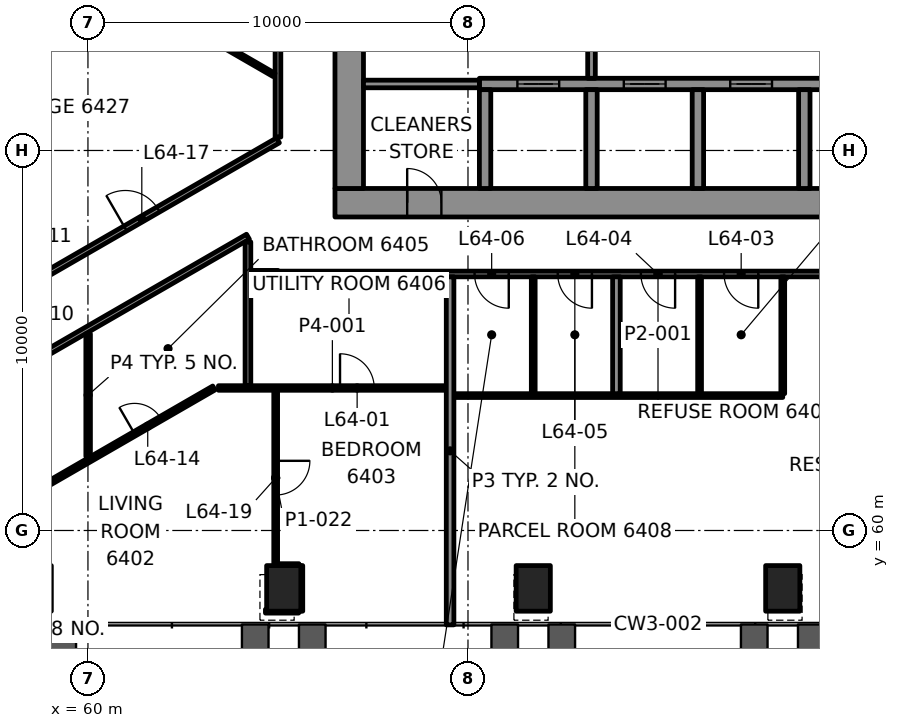
"""IFC4 building model, lengths in metres.
Left out: names, types, materials, properties, quantities, classifications, styles, units other than length and angle.
Written with IfcOpenShell. Run it as: python <this file> out.ifc"""

import sys

from ifc_helpers import new_model, si_unit, direction, frame, frame_2d, origin, origin_2d, place, context, subcontext, project, spatial, rectangle, hollow_rectangle, extrude, element, fill, save


model = new_model("IFC4")
c1 = context("Model", 3, precision=1e-05, world=origin(), true_north=direction((0.0, 1.0)))
c2 = subcontext(c1, "Body", "Model", "MODEL_VIEW")
j1 = project(units=[si_unit("LENGTHUNIT", "METRE"), si_unit("PLANEANGLEUNIT", "RADIAN")], contexts=[c1])
p1 = place(None, origin())
s1 = spatial("IfcSite", under=j1, at=p1, CompositionType="ELEMENT")
p2 = place(p1, origin())
s2 = spatial("IfcBuilding", under=s1, at=p2, CompositionType="ELEMENT")
p3 = place(p2, frame((0.0, 0.0, 270.6)))
s3 = spatial("IfcBuildingStorey", under=s2, at=p3, CompositionType="ELEMENT", Elevation=270.6)
for number, where, z_axis, x_axis in (
    (1, (65.152, 58.476, -0.0), (0.0, 0.0, 1.0), (1.0, 0.0, 0.0)),
    (2, (71.717, 58.476, -0.0), (0.0, 0.0, 1.0), (1.0, 0.0, 0.0)),
    (3, (78.283, 58.476, -0.0), (0.0, 0.0, 1.0), (1.0, 0.0, 0.0)),
):
    element("IfcColumn", number, at=place(p3, frame(where, z_axis=z_axis, x_axis=x_axis)), inside=s3, PredefinedType="COLUMN", context=c2, shape_type="SweptSolid", body=[
        extrude(hollow_rectangle(XDim=0.9, YDim=1.2, WallThickness=0.06, at=origin_2d()), origin(), (0.0, 0.0, 1.0), 3.5),
    ])
p4 = place(p3, frame((66.5, 68.625, 0.0), z_axis=(0.0, 0.0, 1.0), x_axis=(1.0, 0.0, 0.0)))
e4 = element("IfcWall", 4, at=p4, inside=s3, PredefinedType="SHEAR", context=c2, shape_type="SweptSolid", body=[
    extrude(rectangle(XDim=17.0, YDim=0.75, at=frame_2d((8.5, 0.0))), origin(), (0.0, 0.0, 1.0), 3.3),
])
p5 = place(p4, frame((1.9, 0.0, 0.0)))
e5 = element("IfcOpeningElement", 5, at=p5, cuts=e4, PredefinedType="OPENING", context=c2, shape_type="SweptSolid", body=[
    extrude(rectangle(XDim=0.9, YDim=2.1, at=frame_2d((0.45, 1.05))), frame((0.0, 0.385, 0.0), z_axis=(0.0, -1.0, 0.0), x_axis=(1.0, 0.0, 0.0)), (0.0, 0.0, 1.0), 0.77),
])
p6 = place(p3, frame((66.875, 69.0, 0.0), z_axis=(0.0, 0.0, 1.0), x_axis=(0.0, 1.0, 0.0)))
e6 = element("IfcWall", 6, at=p6, inside=s3, PredefinedType="SHEAR", context=c2, shape_type="SweptSolid", body=[
    extrude(rectangle(XDim=12.0, YDim=0.75, at=frame_2d((6.0, 0.0))), origin(), (0.0, 0.0, 1.0), 3.3),
])
p7 = place(p6, frame((3.7, 0.0, 0.0)))
e7 = element("IfcOpeningElement", 7, at=p7, cuts=e6, PredefinedType="OPENING", context=c2, shape_type="SweptSolid", body=[
    extrude(rectangle(XDim=1.2, YDim=2.1, at=frame_2d((0.6, 1.05))), frame((0.0, 0.385, 0.0), z_axis=(0.0, -1.0, 0.0), x_axis=(1.0, 0.0, 0.0)), (0.0, 0.0, 1.0), 0.77),
])
p8 = place(p3, frame((70.3, 71.75, 0.0), z_axis=(0.0, 0.0, 1.0), x_axis=(1.0, 0.0, 0.0)))
e8 = element("IfcWall", 8, at=p8, inside=s3, PredefinedType="SHEAR", context=c2, shape_type="SweptSolid", body=[
    extrude(rectangle(XDim=11.5, YDim=0.3, at=frame_2d((5.75, 0.0))), origin(), (0.0, 0.0, 1.0), 3.3),
])
p9 = place(p8, frame((1.0, 0.0, 0.0)))
e9 = element("IfcOpeningElement", 9, at=p9, cuts=e8, PredefinedType="OPENING", context=c2, shape_type="SweptSolid", body=[
    extrude(rectangle(XDim=1.1, YDim=2.1, at=frame_2d((0.55, 1.05))), frame((0.0, 0.16, 0.0), z_axis=(0.0, -1.0, 0.0), x_axis=(1.0, 0.0, 0.0)), (0.0, 0.0, 1.0), 0.32),
])
p10 = place(p8, frame((3.8, 0.0, 0.0)))
e10 = element("IfcOpeningElement", 10, at=p10, cuts=e8, PredefinedType="OPENING", context=c2, shape_type="SweptSolid", body=[
    extrude(rectangle(XDim=1.1, YDim=2.1, at=frame_2d((0.55, 1.05))), frame((0.0, 0.16, 0.0), z_axis=(0.0, -1.0, 0.0), x_axis=(1.0, 0.0, 0.0)), (0.0, 0.0, 1.0), 0.32),
])
p11 = place(p8, frame((6.6, 0.0, 0.0)))
e11 = element("IfcOpeningElement", 11, at=p11, cuts=e8, PredefinedType="OPENING", context=c2, shape_type="SweptSolid", body=[
    extrude(rectangle(XDim=1.1, YDim=2.1, at=frame_2d((0.55, 1.05))), frame((0.0, 0.16, 0.0), z_axis=(0.0, -1.0, 0.0), x_axis=(1.0, 0.0, 0.0)), (0.0, 0.0, 1.0), 0.32),
])
p12 = place(p8, frame((9.4, 0.0, 0.0)))
e12 = element("IfcOpeningElement", 12, at=p12, cuts=e8, PredefinedType="OPENING", context=c2, shape_type="SweptSolid", body=[
    extrude(rectangle(XDim=1.1, YDim=2.1, at=frame_2d((0.55, 1.05))), frame((0.0, 0.16, 0.0), z_axis=(0.0, -1.0, 0.0), x_axis=(1.0, 0.0, 0.0)), (0.0, 0.0, 1.0), 0.32),
])
for number, where, z_axis, x_axis in (
    (13, (70.45, 69.0, 0.0), (0.0, 0.0, 1.0), (0.0, 1.0, 0.0)),
    (14, (73.25, 69.0, 0.0), (0.0, 0.0, 1.0), (0.0, 1.0, 0.0)),
    (15, (76.05, 69.0, 0.0), (0.0, 0.0, 1.0), (0.0, 1.0, 0.0)),
    (16, (78.85, 69.0, 0.0), (0.0, 0.0, 1.0), (0.0, 1.0, 0.0)),
):
    element("IfcWall", number, at=place(p3, frame(where, z_axis=z_axis, x_axis=x_axis)), inside=s3, PredefinedType="SHEAR", context=c2, shape_type="SweptSolid", body=[
        extrude(rectangle(XDim=2.6, YDim=0.3, at=frame_2d((1.3, 0.0))), origin(), (0.0, 0.0, 1.0), 3.3),
    ])
p13 = place(p3, frame((64.67, 57.876, 0.0), z_axis=(0.0, 0.0, 1.0), x_axis=(1.0, 0.0, 0.0)))
e17 = element("IfcWall", 17, at=p13, inside=s3, PredefinedType="PARTITIONING", context=c2, shape_type="SweptSolid", body=[
    extrude(rectangle(XDim=0.875, YDim=0.1, at=frame_2d((0.438, 0.0))), origin(), (0.0, 0.0, 1.0), 2.7),
])
p14 = place(p3, frame((64.99, 59.076, 0.0), z_axis=(0.0, 0.0, 1.0), x_axis=(1.0, 0.0, 0.0)))
e18 = element("IfcWall", 18, at=p14, inside=s3, PredefinedType="PARTITIONING", context=c2, shape_type="SweptSolid", body=[
    extrude(rectangle(XDim=0.562, YDim=0.1, at=frame_2d((0.281, 0.0))), origin(), (0.0, 0.0, 1.0), 2.7),
])
p15 = place(p3, frame((69.629, 63.55, 0.0), z_axis=(0.0, 0.0, 1.0), x_axis=(1.0, 0.0, 0.0)))
e19 = element("IfcWall", 19, at=p15, inside=s3, PredefinedType="PARTITIONING", context=c2, shape_type="SweptSolid", body=[
    extrude(rectangle(XDim=8.653, YDim=0.1, at=frame_2d((4.326, 0.0))), origin(), (0.0, 0.0, 1.0), 2.7),
])
p16 = place(p3, frame((63.434, 63.75, 0.0), z_axis=(0.0, 0.0, 1.0), x_axis=(1.0, 0.0, 0.0)))
e20 = element("IfcWall", 20, at=p16, inside=s3, PredefinedType="PARTITIONING", context=c2, shape_type="SweptSolid", body=[
    extrude(rectangle(XDim=5.995, YDim=0.12, at=frame_2d((2.997, 0.0))), origin(), (0.0, 0.0, 1.0), 2.7),
])
p17 = place(p16, frame((3.199, 0.0, 0.0)))
e21 = element("IfcOpeningElement", 21, at=p17, cuts=e20, PredefinedType="OPENING", context=c2, shape_type="SweptSolid", body=[
    extrude(rectangle(XDim=0.9, YDim=2.1, at=frame_2d((0.45, 1.05))), frame((0.0, 0.07, 0.0), z_axis=(0.0, -1.0, 0.0), x_axis=(1.0, 0.0, 0.0)), (0.0, 0.0, 1.0), 0.14),
])
p18 = place(p3, frame((85.0, 66.75, 0.0), z_axis=(0.0, 0.0, 1.0), x_axis=(-1.0, 0.0, 0.0)))
e22 = element("IfcWall", 22, at=p18, inside=s3, PredefinedType="PARTITIONING", context=c2, shape_type="SweptSolid", body=[
    extrude(rectangle(XDim=19.999, YDim=0.15, at=frame_2d((10.0, 0.0))), origin(), (0.0, 0.0, 1.0), 2.7),
])
p19 = place(p18, frame((2.96, 0.0, 0.0)))
e23 = element("IfcOpeningElement", 23, at=p19, cuts=e22, PredefinedType="OPENING", context=c2, shape_type="SweptSolid", body=[
    extrude(rectangle(XDim=1.0, YDim=2.1, at=frame_2d((0.5, 1.05))), frame((0.0, 0.085, 0.0), z_axis=(0.0, -1.0, 0.0), x_axis=(1.0, 0.0, 0.0)), (0.0, 0.0, 1.0), 0.17),
])
p20 = place(p18, frame((7.361, 0.0, 0.0)))
e24 = element("IfcOpeningElement", 24, at=p20, cuts=e22, PredefinedType="OPENING", context=c2, shape_type="SweptSolid", body=[
    extrude(rectangle(XDim=0.9, YDim=2.1, at=frame_2d((0.45, 1.05))), frame((0.0, 0.085, 0.0), z_axis=(0.0, -1.0, 0.0), x_axis=(1.0, 0.0, 0.0)), (0.0, 0.0, 1.0), 0.17),
])
p21 = place(p18, frame((9.55, 0.0, 0.0)))
e25 = element("IfcOpeningElement", 25, at=p21, cuts=e22, PredefinedType="OPENING", context=c2, shape_type="SweptSolid", body=[
    extrude(rectangle(XDim=0.9, YDim=2.1, at=frame_2d((0.45, 1.05))), frame((0.0, 0.085, 0.0), z_axis=(0.0, -1.0, 0.0), x_axis=(1.0, 0.0, 0.0)), (0.0, 0.0, 1.0), 0.17),
])
p22 = place(p18, frame((11.738, 0.0, 0.0)))
e26 = element("IfcOpeningElement", 26, at=p22, cuts=e22, PredefinedType="OPENING", context=c2, shape_type="SweptSolid", body=[
    extrude(rectangle(XDim=0.9, YDim=2.1, at=frame_2d((0.45, 1.05))), frame((0.0, 0.085, 0.0), z_axis=(0.0, -1.0, 0.0), x_axis=(1.0, 0.0, 0.0)), (0.0, 0.0, 1.0), 0.17),
])
p23 = place(p18, frame((13.926, 0.0, 0.0)))
e27 = element("IfcOpeningElement", 27, at=p23, cuts=e22, PredefinedType="OPENING", context=c2, shape_type="SweptSolid", body=[
    extrude(rectangle(XDim=0.9, YDim=2.1, at=frame_2d((0.45, 1.05))), frame((0.0, 0.085, 0.0), z_axis=(0.0, -1.0, 0.0), x_axis=(1.0, 0.0, 0.0)), (0.0, 0.0, 1.0), 0.17),
])
p24 = place(p3, frame((64.295, 66.769, 0.0), z_axis=(0.0, 0.0, 1.0), x_axis=(1.0, 0.0, 0.0)))
e28 = element("IfcWall", 28, at=p24, inside=s3, PredefinedType="PARTITIONING", context=c2, shape_type="SweptSolid", body=[
    extrude(rectangle(XDim=0.705, YDim=0.15, at=frame_2d((0.353, 0.0))), origin(), (0.0, 0.0, 1.0), 2.7),
])
p25 = place(p3, frame((52.517, 57.516, 0.0), z_axis=(0.0, 0.0, 1.0), x_axis=(0.866028080334, 0.499995364051, 0.0)))
e29 = element("IfcWall", 29, at=p25, inside=s3, PredefinedType="PARTITIONING", context=c2, shape_type="SweptSolid", body=[
    extrude(rectangle(XDim=12.467, YDim=0.12, at=frame_2d((6.234, 0.0))), origin(), (0.0, 0.0, 1.0), 2.7),
])
p26 = place(p25, frame((3.019, 0.0, 0.0)))
e30 = element("IfcOpeningElement", 30, at=p26, cuts=e29, PredefinedType="OPENING", context=c2, shape_type="SweptSolid", body=[
    extrude(rectangle(XDim=0.9, YDim=2.1, at=frame_2d((0.45, 1.05))), frame((0.0, 0.07, 0.0), z_axis=(0.0, -1.0, 0.0), x_axis=(1.0, 0.0, 0.0)), (0.0, 0.0, 1.0), 0.14),
])
p27 = place(p25, frame((10.057, 0.0, 0.0)))
e31 = element("IfcOpeningElement", 31, at=p27, cuts=e29, PredefinedType="OPENING", context=c2, shape_type="SweptSolid", body=[
    extrude(rectangle(XDim=0.8, YDim=2.1, at=frame_2d((0.4, 1.05))), frame((0.0, 0.07, 0.0), z_axis=(0.0, -1.0, 0.0), x_axis=(1.0, 0.0, 0.0)), (0.0, 0.0, 1.0), 0.14),
])
p28 = place(p3, frame((64.21, 67.731, 0.0), z_axis=(0.0, 0.0, 1.0), x_axis=(-0.866027247007, -0.499996807431, 0.0)))
e32 = element("IfcWall", 32, at=p28, inside=s3, PredefinedType="PARTITIONING", context=c2, shape_type="SweptSolid", body=[
    extrude(rectangle(XDim=12.633, YDim=0.15, at=frame_2d((6.316, 0.0))), origin(), (0.0, 0.0, 1.0), 2.547),
])
p29 = place(p28, frame((8.143, 0.0, 0.0)))
e33 = element("IfcOpeningElement", 33, at=p29, cuts=e32, PredefinedType="OPENING", context=c2, shape_type="SweptSolid", body=[
    extrude(rectangle(XDim=1.0, YDim=2.1, at=frame_2d((0.5, 1.05))), frame((0.0, 0.085, 0.0), z_axis=(0.0, -1.0, 0.0), x_axis=(1.0, 0.0, 0.0)), (0.0, 0.0, 1.0), 0.17),
])
p30 = place(p3, frame((52.37, 62.974, 0.0), z_axis=(0.0, 0.0, 1.0), x_axis=(0.866025849409, 0.499999228155, 0.0)))
e34 = element("IfcWall", 34, at=p30, inside=s3, PredefinedType="PARTITIONING", context=c2, shape_type="SweptSolid", body=[
    extrude(rectangle(XDim=14.584, YDim=0.15, at=frame_2d((7.292, 0.0))), origin(), (0.0, 0.0, 1.0), 2.7),
])
p31 = place(p30, frame((2.858, 0.0, 0.0)))
e35 = element("IfcOpeningElement", 35, at=p31, cuts=e34, PredefinedType="OPENING", context=c2, shape_type="SweptSolid", body=[
    extrude(rectangle(XDim=1.0, YDim=2.1, at=frame_2d((0.5, 1.05))), frame((0.0, 0.085, 0.0), z_axis=(0.0, -1.0, 0.0), x_axis=(1.0, 0.0, 0.0)), (0.0, 0.0, 1.0), 0.17),
])
p32 = place(p30, frame((9.947, 0.0, 0.0)))
e36 = element("IfcOpeningElement", 36, at=p32, cuts=e34, PredefinedType="OPENING", context=c2, shape_type="SweptSolid", body=[
    extrude(rectangle(XDim=1.0, YDim=2.1, at=frame_2d((0.5, 1.05))), frame((0.0, 0.085, 0.0), z_axis=(0.0, -1.0, 0.0), x_axis=(1.0, 0.0, 0.0)), (0.0, 0.0, 1.0), 0.17),
])
p33 = place(p3, frame((78.283, 63.601, 0.0), z_axis=(0.0, 0.0, 1.0), x_axis=(0.0, 1.0, 0.0)))
e37 = element("IfcWall", 37, at=p33, inside=s3, PredefinedType="PARTITIONING", context=c2, shape_type="SweptSolid", body=[
    extrude(rectangle(XDim=3.074, YDim=0.1, at=frame_2d((1.537, 0.0))), origin(), (0.0, 0.0, 1.0), 2.7),
])
p34 = place(p3, frame((76.094, 63.6, 0.0), z_axis=(0.0, 0.0, 1.0), x_axis=(0.0, 1.0, 0.0)))
e38 = element("IfcWall", 38, at=p34, inside=s3, PredefinedType="PARTITIONING", context=c2, shape_type="SweptSolid", body=[
    extrude(rectangle(XDim=3.075, YDim=0.1, at=frame_2d((1.538, 0.0))), origin(), (0.0, 0.0, 1.0), 2.7),
])
p35 = place(p3, frame((73.906, 63.6, 0.0), z_axis=(0.0, 0.0, 1.0), x_axis=(0.0, 1.0, 0.0)))
e39 = element("IfcWall", 39, at=p35, inside=s3, PredefinedType="PARTITIONING", context=c2, shape_type="SweptSolid", body=[
    extrude(rectangle(XDim=3.075, YDim=0.2, at=frame_2d((1.538, 0.0))), origin(), (0.0, 0.0, 1.0), 2.7),
])
p36 = place(p3, frame((71.717, 63.6, 0.0), z_axis=(0.0, 0.0, 1.0), x_axis=(0.0, 1.0, 0.0)))
e40 = element("IfcWall", 40, at=p36, inside=s3, PredefinedType="PARTITIONING", context=c2, shape_type="SweptSolid", body=[
    extrude(rectangle(XDim=3.075, YDim=0.1, at=frame_2d((1.538, 0.0))), origin(), (0.0, 0.0, 1.0), 2.7),
])
p37 = place(p3, frame((69.529, 57.516, 0.0), z_axis=(0.0, 0.0, 1.0), x_axis=(0.0, 1.0, 0.0)))
e41 = element("IfcWall", 41, at=p37, inside=s3, PredefinedType="PARTITIONING", context=c2, shape_type="SweptSolid", body=[
    extrude(rectangle(XDim=9.159, YDim=0.2, at=frame_2d((4.579, 0.0))), origin(), (0.0, 0.0, 1.0), 2.688),
])
p38 = place(p3, frame((65.602, 57.876, 0.0), z_axis=(0.0, 0.0, 1.0), x_axis=(0.0, 1.0, 0.0)))
e42 = element("IfcWall", 42, at=p38, inside=s3, PredefinedType="PARTITIONING", context=c2, shape_type="SweptSolid", body=[
    extrude(rectangle(XDim=1.2, YDim=0.1, at=frame_2d((0.6, 0.0))), origin(), (0.0, 0.0, 1.0), 2.688),
])
p39 = place(p3, frame((65.0, 70.352, 0.0), z_axis=(0.0, 0.0, 1.0), x_axis=(0.0, 1.0, 0.0)))
e43 = element("IfcWall", 43, at=p39, inside=s3, PredefinedType="PARTITIONING", context=c2, shape_type="SweptSolid", body=[
    extrude(rectangle(XDim=12.898, YDim=0.15, at=frame_2d((6.449, 0.0))), origin(), (0.0, 0.0, 1.0), 2.7),
])
p40 = place(p3, frame((64.94, 63.69, 0.0), z_axis=(0.0, 0.0, 1.0), x_axis=(0.0, -1.0, 0.0)))
e44 = element("IfcWall", 44, at=p40, inside=s3, PredefinedType="PARTITIONING", context=c2, shape_type="SweptSolid", body=[
    extrude(rectangle(XDim=4.614, YDim=0.1, at=frame_2d((2.307, 0.0))), origin(), (0.0, 0.0, 1.0), 2.7),
])
p41 = place(p40, frame((1.857, 0.0, 0.0)))
e45 = element("IfcOpeningElement", 45, at=p41, cuts=e44, PredefinedType="OPENING", context=c2, shape_type="SweptSolid", body=[
    extrude(rectangle(XDim=0.9, YDim=2.1, at=frame_2d((0.45, 1.05))), frame((0.0, 0.06, 0.0), z_axis=(0.0, -1.0, 0.0), x_axis=(1.0, 0.0, 0.0)), (0.0, 0.0, 1.0), 0.12),
])
p42 = place(p3, frame((64.21, 63.81, 0.0), z_axis=(0.0, 0.0, 1.0), x_axis=(0.0, 1.0, 0.0)))
e46 = element("IfcWall", 46, at=p42, inside=s3, PredefinedType="PARTITIONING", context=c2, shape_type="SweptSolid", body=[
    extrude(rectangle(XDim=3.784, YDim=0.15, at=frame_2d((1.892, 0.0))), origin(), (0.0, 0.0, 1.0), 2.547),
])
p43 = place(p3, frame((60.005, 61.948, 0.0), z_axis=(0.0, 0.0, 1.0), x_axis=(0.0, 1.0, 0.0)))
e47 = element("IfcWall", 47, at=p43, inside=s3, PredefinedType="PARTITIONING", context=c2, shape_type="SweptSolid", body=[
    extrude(rectangle(XDim=3.228, YDim=0.12, at=frame_2d((1.614, 0.0))), origin(), (0.0, 0.0, 1.0), 2.547),
])
p44 = place(p3, frame((64.899, 71.987, 0.0), z_axis=(0.0, 0.0, 1.0), x_axis=(-0.866032610133, 0.499987518031, 0.0)))
e48 = element("IfcWall", 48, at=p44, inside=s3, PredefinedType="PARTITIONING", context=c2, shape_type="SweptSolid", body=[
    extrude(rectangle(XDim=3.295, YDim=0.1, at=frame_2d((1.648, 0.0))), origin(), (0.0, 0.0, 1.0), 2.7),
])
p45 = place(p3, frame((67.25, 71.75, 0.0), z_axis=(0.0, 0.0, 1.0), x_axis=(1.0, 0.0, 0.0)))
e49 = element("IfcWall", 49, at=p45, inside=s3, PredefinedType="PARTITIONING", context=c2, shape_type="SweptSolid", body=[
    extrude(rectangle(XDim=3.05, YDim=0.2, at=frame_2d((1.525, 0.0))), origin(), (0.0, 0.0, 1.0), 3.3),
])
p46 = place(p3, frame((73.25, 71.9, 0.0), z_axis=(0.0, 0.0, 1.0), x_axis=(0.0, 1.0, 0.0)))
e50 = element("IfcWall", 50, at=p46, inside=s3, PredefinedType="PARTITIONING", context=c2, shape_type="SweptSolid", body=[
    extrude(rectangle(XDim=2.8, YDim=0.2, at=frame_2d((1.4, 0.0))), origin(), (0.0, 0.0, 1.0), 3.3),
])
p47 = place(p46, frame((0.8, 0.0, 0.0)))
e51 = element("IfcOpeningElement", 51, at=p47, cuts=e50, PredefinedType="OPENING", context=c2, shape_type="SweptSolid", body=[
    extrude(rectangle(XDim=1.2, YDim=2.1, at=frame_2d((0.6, 1.05))), frame((0.0, 0.11, 0.0), z_axis=(0.0, -1.0, 0.0), x_axis=(1.0, 0.0, 0.0)), (0.0, 0.0, 1.0), 0.22),
])
p48 = place(p17, origin())
e52 = element("IfcDoor", 52, at=p48, inside=s3, OperationType="SINGLE_SWING_LEFT", PredefinedType="DOOR", context=c2, shape_type="SweptSolid", body=[
    extrude(rectangle(XDim=0.9, YDim=2.1, at=frame_2d((0.45, 1.05))), frame((0.0, 0.025, 0.0), z_axis=(0.0, -1.0, 0.0), x_axis=(1.0, 0.0, 0.0)), (0.0, 0.0, 1.0), 0.05),
])
fill(e21, e52)
p49 = place(p20, origin())
e53 = element("IfcDoor", 53, at=p49, inside=s3, OperationType="SINGLE_SWING_RIGHT", PredefinedType="DOOR", context=c2, shape_type="SweptSolid", body=[
    extrude(rectangle(XDim=0.9, YDim=2.1, at=frame_2d((0.45, 1.05))), frame((0.0, 0.025, 0.0), z_axis=(0.0, -1.0, 0.0), x_axis=(1.0, 0.0, 0.0)), (0.0, 0.0, 1.0), 0.05),
])
fill(e24, e53)
p50 = place(p21, origin())
e54 = element("IfcDoor", 54, at=p50, inside=s3, OperationType="SINGLE_SWING_LEFT", PredefinedType="DOOR", context=c2, shape_type="SweptSolid", body=[
    extrude(rectangle(XDim=0.9, YDim=2.1, at=frame_2d((0.45, 1.05))), frame((0.0, 0.025, 0.0), z_axis=(0.0, -1.0, 0.0), x_axis=(1.0, 0.0, 0.0)), (0.0, 0.0, 1.0), 0.05),
])
fill(e25, e54)
p51 = place(p22, origin())
e55 = element("IfcDoor", 55, at=p51, inside=s3, OperationType="SINGLE_SWING_RIGHT", PredefinedType="DOOR", context=c2, shape_type="SweptSolid", body=[
    extrude(rectangle(XDim=0.9, YDim=2.1, at=frame_2d((0.45, 1.05))), frame((0.0, 0.025, 0.0), z_axis=(0.0, -1.0, 0.0), x_axis=(1.0, 0.0, 0.0)), (0.0, 0.0, 1.0), 0.05),
])
fill(e26, e55)
p52 = place(p23, origin())
e56 = element("IfcDoor", 56, at=p52, inside=s3, OperationType="SINGLE_SWING_LEFT", PredefinedType="DOOR", context=c2, shape_type="SweptSolid", body=[
    extrude(rectangle(XDim=0.9, YDim=2.1, at=frame_2d((0.45, 1.05))), frame((0.0, 0.025, 0.0), z_axis=(0.0, -1.0, 0.0), x_axis=(1.0, 0.0, 0.0)), (0.0, 0.0, 1.0), 0.05),
])
fill(e27, e56)
p53 = place(p27, origin())
e57 = element("IfcDoor", 57, at=p53, inside=s3, OperationType="SINGLE_SWING_RIGHT", PredefinedType="DOOR", context=c2, shape_type="SweptSolid", body=[
    extrude(rectangle(XDim=0.8, YDim=2.1, at=frame_2d((0.4, 1.05))), frame((0.0, 0.025, 0.0), z_axis=(0.0, -1.0, 0.0), x_axis=(1.0, 0.0, 0.0)), (0.0, 0.0, 1.0), 0.05),
])
fill(e31, e57)
p54 = place(p32, origin())
e58 = element("IfcDoor", 58, at=p54, inside=s3, OperationType="SINGLE_SWING_RIGHT", PredefinedType="DOOR", context=c2, shape_type="SweptSolid", body=[
    extrude(rectangle(XDim=1.0, YDim=2.1, at=frame_2d((0.5, 1.05))), frame((0.0, 0.025, 0.0), z_axis=(0.0, -1.0, 0.0), x_axis=(1.0, 0.0, 0.0)), (0.0, 0.0, 1.0), 0.05),
])
fill(e36, e58)
p55 = place(p41, origin())
e59 = element("IfcDoor", 59, at=p55, inside=s3, OperationType="SINGLE_SWING_RIGHT", PredefinedType="DOOR", context=c2, shape_type="SweptSolid", body=[
    extrude(rectangle(XDim=0.9, YDim=2.1, at=frame_2d((0.45, 1.05))), frame((0.0, 0.025, 0.0), z_axis=(0.0, -1.0, 0.0), x_axis=(1.0, 0.0, 0.0)), (0.0, 0.0, 1.0), 0.05),
])
fill(e45, e59)
p56 = place(p9, origin())
e60 = element("IfcDoor", 60, at=p56, inside=s3, OperationType="DOUBLE_DOOR_SLIDING", PredefinedType="DOOR", context=c2, shape_type="SweptSolid", body=[
    extrude(rectangle(XDim=1.1, YDim=2.1, at=frame_2d((0.55, 1.05))), frame((0.0, 0.025, 0.0), z_axis=(0.0, -1.0, 0.0), x_axis=(1.0, 0.0, 0.0)), (0.0, 0.0, 1.0), 0.05),
])
fill(e9, e60)
p57 = place(p10, origin())
e61 = element("IfcDoor", 61, at=p57, inside=s3, OperationType="DOUBLE_DOOR_SLIDING", PredefinedType="DOOR", context=c2, shape_type="SweptSolid", body=[
    extrude(rectangle(XDim=1.1, YDim=2.1, at=frame_2d((0.55, 1.05))), frame((0.0, 0.025, 0.0), z_axis=(0.0, -1.0, 0.0), x_axis=(1.0, 0.0, 0.0)), (0.0, 0.0, 1.0), 0.05),
])
fill(e10, e61)
p58 = place(p11, origin())
e62 = element("IfcDoor", 62, at=p58, inside=s3, OperationType="DOUBLE_DOOR_SLIDING", PredefinedType="DOOR", context=c2, shape_type="SweptSolid", body=[
    extrude(rectangle(XDim=1.1, YDim=2.1, at=frame_2d((0.55, 1.05))), frame((0.0, 0.025, 0.0), z_axis=(0.0, -1.0, 0.0), x_axis=(1.0, 0.0, 0.0)), (0.0, 0.0, 1.0), 0.05),
])
fill(e11, e62)
p59 = place(p5, origin())
e63 = element("IfcDoor", 63, at=p59, inside=s3, OperationType="SINGLE_SWING_RIGHT", PredefinedType="DOOR", context=c2, shape_type="SweptSolid", body=[
    extrude(rectangle(XDim=0.9, YDim=2.1, at=frame_2d((0.45, 1.05))), frame((0.0, 0.095, 0.0), z_axis=(0.0, -1.0, 0.0), x_axis=(1.0, 0.0, 0.0)), (0.0, 0.0, 1.0), 0.19),
])
fill(e5, e63)
save(model, sys.argv[1])
